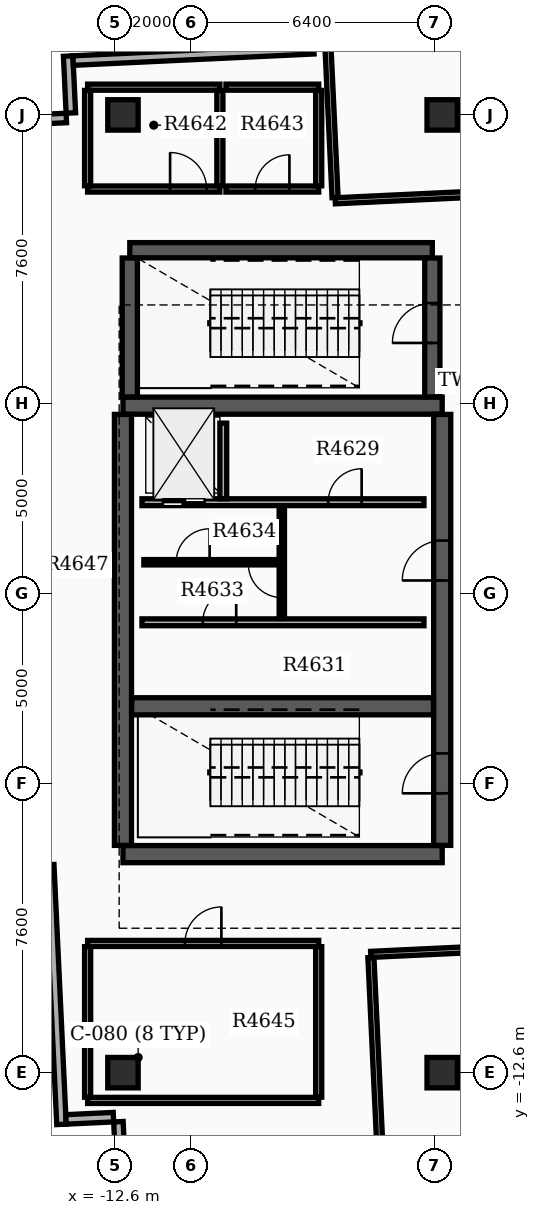
"""IFC4 building model, lengths in metres.
Left out: names, types, materials, properties, quantities, classifications, styles, units other than length and angle.
Written with IfcOpenShell. Run it as: python <this file> out.ifc"""

import sys

from ifc_helpers import new_model, si_unit, direction, frame, frame_2d, origin, origin_2d, place, context, subcontext, project, spatial, rectangle, extrude, element, fill, save


model = new_model("IFC4")
c1 = context("Model", 3, precision=1e-05, world=origin(), true_north=direction((0.0, 1.0)))
c2 = subcontext(c1, "Body", "Model", "MODEL_VIEW")
j1 = project(units=[si_unit("LENGTHUNIT", "METRE"), si_unit("PLANEANGLEUNIT", "RADIAN")], contexts=[c1])
p1 = place(None, origin())
s1 = spatial("IfcSite", under=j1, at=p1, CompositionType="ELEMENT")
p2 = place(p1, origin())
s2 = spatial("IfcBuilding", under=s1, at=p2, CompositionType="ELEMENT")
p3 = place(p2, frame((0.0, 0.0, 294.0)))
s3 = spatial("IfcBuildingStorey", under=s2, at=p3, CompositionType="ELEMENT", Elevation=294.0)
for number, where, z_axis, x_axis in (
    (1, (-12.4, -6.85, 0.0), (0.0, 0.0, 1.0), (1.0, 0.0, 0.0)),
    (2, (-12.4, 4.95, 0.0), (0.0, 0.0, 1.0), (1.0, 0.0, 0.0)),
):
    element("IfcWall", number, at=place(p3, frame(where, z_axis=z_axis, x_axis=x_axis)), inside=s3, PredefinedType="SHEAR", context=c2, shape_type="SweptSolid", body=[
        extrude(rectangle(XDim=8.4, YDim=0.45, at=frame_2d((4.2, 0.0))), origin(), (0.0, 0.0, 1.0), 5.15),
    ])
p4 = place(p3, frame((-12.4, -6.62, 0.0), z_axis=(0.0, 0.0, 1.0), x_axis=(0.0, 1.0, 0.0)))
e3 = element("IfcWall", 3, at=p4, inside=s3, PredefinedType="SHEAR", context=c2, shape_type="SweptSolid", body=[
    extrude(rectangle(XDim=11.34, YDim=0.45, at=frame_2d((5.67, 0.0))), origin(), (0.0, 0.0, 1.0), 5.15),
])
p5 = place(p3, frame((-4.0, -6.62, 0.0), z_axis=(0.0, 0.0, 1.0), x_axis=(0.0, 1.0, 0.0)))
e4 = element("IfcWall", 4, at=p5, inside=s3, PredefinedType="SHEAR", context=c2, shape_type="SweptSolid", body=[
    extrude(rectangle(XDim=11.34, YDim=0.45, at=frame_2d((5.67, 0.0))), origin(), (0.0, 0.0, 1.0), 5.15),
])
p6 = place(p5, frame((1.37, 0.0, 0.0)))
e5 = element("IfcOpeningElement", 5, at=p6, cuts=e4, PredefinedType="OPENING", context=c2, shape_type="SweptSolid", body=[
    extrude(rectangle(XDim=1.05, YDim=2.15, at=frame_2d((0.525, 1.075))), frame((0.0, 0.235, 0.0), z_axis=(0.0, -1.0, 0.0), x_axis=(1.0, 0.0, 0.0)), (0.0, 0.0, 1.0), 0.47),
])
p7 = place(p5, frame((6.97, 0.0, 0.0)))
e6 = element("IfcOpeningElement", 6, at=p7, cuts=e4, PredefinedType="OPENING", context=c2, shape_type="SweptSolid", body=[
    extrude(rectangle(XDim=1.05, YDim=2.15, at=frame_2d((0.525, 1.075))), frame((0.0, 0.235, 0.0), z_axis=(0.0, -1.0, 0.0), x_axis=(1.0, 0.0, 0.0)), (0.0, 0.0, 1.0), 0.47),
])
p8 = place(p3, frame((-12.17, -2.96, 0.0), z_axis=(0.0, 0.0, 1.0), x_axis=(1.0, 0.0, 0.0)))
e7 = element("IfcWall", 7, at=p8, inside=s3, PredefinedType="SHEAR", context=c2, shape_type="SweptSolid", body=[
    extrude(rectangle(XDim=7.94, YDim=0.45, at=frame_2d((3.97, 0.0))), origin(), (0.0, 0.0, 1.0), 5.15),
])
p9 = place(p3, frame((-12.22, 9.04, 0.0), z_axis=(0.0, 0.0, 1.0), x_axis=(1.0, 0.0, 0.0)))
e8 = element("IfcWall", 8, at=p9, inside=s3, PredefinedType="SHEAR", context=c2, shape_type="SweptSolid", body=[
    extrude(rectangle(XDim=7.96, YDim=0.4, at=frame_2d((3.98, 0.0))), origin(), (0.0, 0.0, 1.0), 5.15),
])
p10 = place(p3, frame((-12.22, 5.18, 0.0), z_axis=(0.0, 0.0, 1.0), x_axis=(0.0, 1.0, 0.0)))
e9 = element("IfcWall", 9, at=p10, inside=s3, PredefinedType="SHEAR", context=c2, shape_type="SweptSolid", body=[
    extrude(rectangle(XDim=3.655, YDim=0.4, at=frame_2d((1.828, 0.0))), origin(), (0.0, 0.0, 1.0), 5.15),
])
p11 = place(p3, frame((-4.26, 5.18, 0.0), z_axis=(0.0, 0.0, 1.0), x_axis=(0.0, 1.0, 0.0)))
e10 = element("IfcWall", 10, at=p11, inside=s3, PredefinedType="SHEAR", context=c2, shape_type="SweptSolid", body=[
    extrude(rectangle(XDim=3.655, YDim=0.4, at=frame_2d((1.828, 0.0))), origin(), (0.0, 0.0, 1.0), 5.15),
])
p12 = place(p11, frame((1.42, 0.0, 0.0)))
e11 = element("IfcOpeningElement", 11, at=p12, cuts=e10, PredefinedType="OPENING", context=c2, shape_type="SweptSolid", body=[
    extrude(rectangle(XDim=1.05, YDim=2.15, at=frame_2d((0.525, 1.075))), frame((0.0, 0.21, 0.0), z_axis=(0.0, -1.0, 0.0), x_axis=(1.0, 0.0, 0.0)), (0.0, 0.0, 1.0), 0.42),
])
for number, where, z_axis, x_axis in (
    (12, (-12.4, -12.6, 0.0), (0.0, 0.0, 1.0), (1.0, 0.0, 0.0)),
    (13, (-12.4, 12.6, 0.0), (0.0, 0.0, 1.0), (1.0, 0.0, 0.0)),
    (14, (-4.0, -12.6, 0.0), (0.0, 0.0, 1.0), (1.0, 0.0, 0.0)),
    (15, (-4.0, 12.6, 0.0), (0.0, 0.0, 1.0), (1.0, 0.0, 0.0)),
):
    element("IfcColumn", number, at=place(p3, frame(where, z_axis=z_axis, x_axis=x_axis)), inside=s3, PredefinedType="COLUMN", context=c2, shape_type="SweptSolid", body=[
        extrude(rectangle(XDim=0.8, YDim=0.8, at=origin_2d()), origin(), (0.0, 0.0, 1.0), 5.4),
    ])
p13 = place(p3, frame((-15.139, 12.461, 0.0), z_axis=(0.0, 0.0, 1.0), x_axis=(0.998891870632, 0.047064113553, 0.0)))
e16 = element("IfcWall", 16, at=p13, inside=s3, PredefinedType="STANDARD", context=c2, shape_type="SweptSolid", body=[
    extrude(rectangle(XDim=1.25, YDim=0.25, at=frame_2d((0.625, 0.0))), origin(), (0.0, 0.0, 1.0), 4.06),
])
p14 = place(p3, frame((-13.771, 12.65, 0.0), z_axis=(0.0, 0.0, 1.0), x_axis=(-0.047039284441, 0.99889304018, 0.0)))
e17 = element("IfcWall", 17, at=p14, inside=s3, PredefinedType="STANDARD", context=c2, shape_type="SweptSolid", body=[
    extrude(rectangle(XDim=1.5, YDim=0.25, at=frame_2d((0.75, 0.0))), origin(), (0.0, 0.0, 1.0), 4.06),
])
p15 = place(p3, frame((-13.711, 14.03, 0.0), z_axis=(0.0, 0.0, 1.0), x_axis=(0.998890417296, 0.047094949127, 0.0)))
e18 = element("IfcWall", 18, at=p15, inside=s3, PredefinedType="STANDARD", context=c2, shape_type="SweptSolid", body=[
    extrude(rectangle(XDim=6.34, YDim=0.25, at=frame_2d((3.17, 0.0))), origin(), (0.0, 0.0, 1.0), 4.06),
])
p16 = place(p3, frame((-14.34, -7.128, 0.0), z_axis=(0.0, 0.0, 1.0), x_axis=(0.047115742593, -0.998889436725, 0.0)))
e19 = element("IfcWall", 19, at=p16, inside=s3, PredefinedType="STANDARD", context=c2, shape_type="SweptSolid", body=[
    extrude(rectangle(XDim=6.84, YDim=0.25, at=frame_2d((3.42, 0.0))), origin(), (0.0, 0.0, 1.0), 4.06),
])
p17 = place(p3, frame((-13.899, -13.83, 0.0), z_axis=(0.0, 0.0, 1.0), x_axis=(0.99889143794, 0.047073296156, 0.0)))
e20 = element("IfcWall", 20, at=p17, inside=s3, PredefinedType="STANDARD", context=c2, shape_type="SweptSolid", body=[
    extrude(rectangle(XDim=1.25, YDim=0.25, at=frame_2d((0.625, 0.0))), origin(), (0.0, 0.0, 1.0), 4.06),
])
p18 = place(p3, frame((-12.52, -13.89, 0.0), z_axis=(0.0, 0.0, 1.0), x_axis=(0.047039284441, -0.99889304018, 0.0)))
e21 = element("IfcWall", 21, at=p18, inside=s3, PredefinedType="STANDARD", context=c2, shape_type="SweptSolid", body=[
    extrude(rectangle(XDim=1.5, YDim=0.25, at=frame_2d((0.75, 0.0))), origin(), (0.0, 0.0, 1.0), 4.06),
])
p19 = place(p3, frame((-11.9, 2.41, 0.0), z_axis=(0.0, 0.0, 1.0), x_axis=(1.0, 0.0, 0.0)))
e22 = element("IfcWall", 22, at=p19, inside=s3, PredefinedType="SOLIDWALL", context=c2, shape_type="SweptSolid", body=[
    extrude(rectangle(XDim=7.42, YDim=0.18, at=frame_2d((3.71, 0.0))), origin(), (0.0, 0.0, 1.0), 4.05),
])
p20 = place(p19, frame((0.55, 0.0, 0.0)))
e23 = element("IfcOpeningElement", 23, at=p20, cuts=e22, PredefinedType="OPENING", context=c2, shape_type="SweptSolid", body=[
    extrude(rectangle(XDim=1.1, YDim=2.15, at=frame_2d((0.55, 1.075))), frame((0.0, 0.1, 0.0), z_axis=(0.0, -1.0, 0.0), x_axis=(1.0, 0.0, 0.0)), (0.0, 0.0, 1.0), 0.2),
])
p21 = place(p19, frame((4.9, 0.0, 0.0)))
e24 = element("IfcOpeningElement", 24, at=p21, cuts=e22, PredefinedType="OPENING", context=c2, shape_type="SweptSolid", body=[
    extrude(rectangle(XDim=0.88, YDim=2.1, at=frame_2d((0.44, 1.05))), frame((0.0, 0.1, 0.0), z_axis=(0.0, -1.0, 0.0), x_axis=(1.0, 0.0, 0.0)), (0.0, 0.0, 1.0), 0.2),
])
p22 = place(p3, frame((-11.9, -0.75, 0.0), z_axis=(0.0, 0.0, 1.0), x_axis=(1.0, 0.0, 0.0)))
e25 = element("IfcWall", 25, at=p22, inside=s3, PredefinedType="SOLIDWALL", context=c2, shape_type="SweptSolid", body=[
    extrude(rectangle(XDim=7.42, YDim=0.18, at=frame_2d((3.71, 0.0))), origin(), (0.0, 0.0, 1.0), 4.05),
])
p23 = place(p22, frame((1.6, 0.0, 0.0)))
e26 = element("IfcOpeningElement", 26, at=p23, cuts=e25, PredefinedType="OPENING", context=c2, shape_type="SweptSolid", body=[
    extrude(rectangle(XDim=0.88, YDim=2.1, at=frame_2d((0.44, 1.05))), frame((0.0, 0.1, 0.0), z_axis=(0.0, -1.0, 0.0), x_axis=(1.0, 0.0, 0.0)), (0.0, 0.0, 1.0), 0.2),
])
p24 = place(p3, frame((-9.76, 2.5, 0.0), z_axis=(0.0, 0.0, 1.0), x_axis=(0.0, 1.0, 0.0)))
e27 = element("IfcWall", 27, at=p24, inside=s3, PredefinedType="SOLIDWALL", context=c2, shape_type="SweptSolid", body=[
    extrude(rectangle(XDim=1.99, YDim=0.18, at=frame_2d((0.995, 0.0))), origin(), (0.0, 0.0, 1.0), 4.05),
])
p25 = place(p3, frame((-8.22, -0.65, 0.0), z_axis=(0.0, 0.0, 1.0), x_axis=(0.0, 1.0, 0.0)))
e28 = element("IfcWall", 28, at=p25, inside=s3, PredefinedType="SOLIDWALL", context=c2, shape_type="SweptSolid", body=[
    extrude(rectangle(XDim=2.96, YDim=0.14, at=frame_2d((1.48, 0.0))), origin(), (0.0, 0.0, 1.0), 4.05),
])
p26 = place(p25, frame((0.55, 0.0, 0.0)))
e29 = element("IfcOpeningElement", 29, at=p26, cuts=e28, PredefinedType="OPENING", context=c2, shape_type="SweptSolid", body=[
    extrude(rectangle(XDim=0.88, YDim=2.1, at=frame_2d((0.44, 1.05))), frame((0.0, 0.08, 0.0), z_axis=(0.0, -1.0, 0.0), x_axis=(1.0, 0.0, 0.0)), (0.0, 0.0, 1.0), 0.16),
])
p27 = place(p3, frame((-11.85, 0.83, 0.0), z_axis=(0.0, 0.0, 1.0), x_axis=(1.0, 0.0, 0.0)))
e30 = element("IfcWall", 30, at=p27, inside=s3, PredefinedType="PARTITIONING", context=c2, shape_type="SweptSolid", body=[
    extrude(rectangle(XDim=3.552, YDim=0.14, at=frame_2d((1.776, 0.0))), origin(), (0.0, 0.0, 1.0), 4.05),
])
p28 = place(p27, frame((0.85, 0.0, 0.0)))
e31 = element("IfcOpeningElement", 31, at=p28, cuts=e30, PredefinedType="OPENING", context=c2, shape_type="SweptSolid", body=[
    extrude(rectangle(XDim=0.88, YDim=2.1, at=frame_2d((0.44, 1.05))), frame((0.0, 0.08, 0.0), z_axis=(0.0, -1.0, 0.0), x_axis=(1.0, 0.0, 0.0)), (0.0, 0.0, 1.0), 0.16),
])
p29 = place(p3, frame((-6.815, 10.341, 0.0), z_axis=(0.0, 0.0, 1.0), x_axis=(0.998890660658, 0.04708978712, 0.0)))
e32 = element("IfcWall", 32, at=p29, inside=s3, PredefinedType="PARTITIONING", context=c2, shape_type="SweptSolid", body=[
    extrude(rectangle(XDim=12.64, YDim=0.16, at=frame_2d((6.32, 0.0))), origin(), (0.0, 0.0, 1.0), 4.05),
])
p30 = place(p29, frame((5.57, 0.0, 0.0)))
e33 = element("IfcOpeningElement", 33, at=p30, cuts=e32, PredefinedType="OPENING", context=c2, shape_type="SweptSolid", body=[
    extrude(rectangle(XDim=1.5, YDim=2.15, at=frame_2d((0.75, 1.075))), frame((0.0, 0.09, 0.0), z_axis=(0.0, -1.0, 0.0), x_axis=(1.0, 0.0, 0.0)), (0.0, 0.0, 1.0), 0.18),
])
p31 = place(p3, frame((-6.819, 10.425, 0.0), z_axis=(0.0, 0.0, 1.0), x_axis=(-0.047112609649, 0.998889584495, 0.0)))
e34 = element("IfcWall", 34, at=p31, inside=s3, PredefinedType="PARTITIONING", context=c2, shape_type="SweptSolid", body=[
    extrude(rectangle(XDim=16.712, YDim=0.16, at=frame_2d((8.356, 0.0))), origin(), (0.0, 0.0, 1.0), 4.05),
])
p32 = place(p3, frame((-5.88, -9.488, 0.0), z_axis=(0.0, 0.0, 1.0), x_axis=(0.998889751946, 0.047109059189, 0.0)))
e35 = element("IfcWall", 35, at=p32, inside=s3, PredefinedType="PARTITIONING", context=c2, shape_type="SweptSolid", body=[
    extrude(rectangle(XDim=12.64, YDim=0.16, at=frame_2d((6.32, 0.0))), origin(), (0.0, 0.0, 1.0), 4.05),
])
p33 = place(p32, frame((5.84, 0.0, 0.0)))
e36 = element("IfcOpeningElement", 36, at=p33, cuts=e35, PredefinedType="OPENING", context=c2, shape_type="SweptSolid", body=[
    extrude(rectangle(XDim=0.96, YDim=2.15, at=frame_2d((0.48, 1.075))), frame((0.0, 0.09, 0.0), z_axis=(0.0, -1.0, 0.0), x_axis=(1.0, 0.0, 0.0)), (0.0, 0.0, 1.0), 0.18),
])
p34 = place(p3, frame((-5.02, -27.714, 0.0), z_axis=(0.0, 0.0, 1.0), x_axis=(-0.047102111975, 0.998890079562, 0.0)))
e37 = element("IfcWall", 37, at=p34, inside=s3, PredefinedType="PARTITIONING", context=c2, shape_type="SweptSolid", body=[
    extrude(rectangle(XDim=18.162, YDim=0.16, at=frame_2d((9.081, 0.0))), origin(), (0.0, 0.0, 1.0), 4.05),
])
p35 = place(p3, frame((-13.33, 10.65, 0.0), z_axis=(0.0, 0.0, 1.0), x_axis=(1.0, 0.0, 0.0)))
e38 = element("IfcWall", 38, at=p35, inside=s3, PredefinedType="PARTITIONING", context=c2, shape_type="SweptSolid", body=[
    extrude(rectangle(XDim=3.48, YDim=0.16, at=frame_2d((1.74, 0.0))), origin(), (0.0, 0.0, 1.0), 4.05),
])
p36 = place(p35, frame((2.17, 0.0, 0.0)))
e39 = element("IfcOpeningElement", 39, at=p36, cuts=e38, PredefinedType="OPENING", context=c2, shape_type="SweptSolid", body=[
    extrude(rectangle(XDim=0.96, YDim=2.15, at=frame_2d((0.48, 1.075))), frame((0.0, 0.09, 0.0), z_axis=(0.0, -1.0, 0.0), x_axis=(1.0, 0.0, 0.0)), (0.0, 0.0, 1.0), 0.18),
])
p37 = place(p3, frame((-13.33, 13.33, 0.0), z_axis=(0.0, 0.0, 1.0), x_axis=(1.0, 0.0, 0.0)))
e40 = element("IfcWall", 40, at=p37, inside=s3, PredefinedType="PARTITIONING", context=c2, shape_type="SweptSolid", body=[
    extrude(rectangle(XDim=3.48, YDim=0.16, at=frame_2d((1.74, 0.0))), origin(), (0.0, 0.0, 1.0), 4.05),
])
for number, where, z_axis, x_axis in (
    (41, (-13.33, 10.735, 0.0), (0.0, 0.0, 1.0), (0.0, 1.0, 0.0)),
    (42, (-9.85, 10.735, 0.0), (0.0, 0.0, 1.0), (0.0, 1.0, 0.0)),
):
    element("IfcWall", number, at=place(p3, frame(where, z_axis=z_axis, x_axis=x_axis)), inside=s3, PredefinedType="PARTITIONING", context=c2, shape_type="SweptSolid", body=[
        extrude(rectangle(XDim=2.51, YDim=0.16, at=frame_2d((1.255, 0.0))), origin(), (0.0, 0.0, 1.0), 4.05),
    ])
p38 = place(p3, frame((-9.69, 10.65, 0.0), z_axis=(0.0, 0.0, 1.0), x_axis=(1.0, 0.0, 0.0)))
e43 = element("IfcWall", 43, at=p38, inside=s3, PredefinedType="PARTITIONING", context=c2, shape_type="SweptSolid", body=[
    extrude(rectangle(XDim=2.44, YDim=0.16, at=frame_2d((1.22, 0.0))), origin(), (0.0, 0.0, 1.0), 4.05),
])
p39 = place(p38, frame((0.77, 0.0, 0.0)))
e44 = element("IfcOpeningElement", 44, at=p39, cuts=e43, PredefinedType="OPENING", context=c2, shape_type="SweptSolid", body=[
    extrude(rectangle(XDim=0.9, YDim=2.15, at=frame_2d((0.45, 1.075))), frame((0.0, 0.09, 0.0), z_axis=(0.0, -1.0, 0.0), x_axis=(1.0, 0.0, 0.0)), (0.0, 0.0, 1.0), 0.18),
])
p40 = place(p3, frame((-9.69, 13.33, 0.0), z_axis=(0.0, 0.0, 1.0), x_axis=(1.0, 0.0, 0.0)))
e45 = element("IfcWall", 45, at=p40, inside=s3, PredefinedType="PARTITIONING", context=c2, shape_type="SweptSolid", body=[
    extrude(rectangle(XDim=2.44, YDim=0.16, at=frame_2d((1.22, 0.0))), origin(), (0.0, 0.0, 1.0), 4.05),
])
p41 = place(p3, frame((-7.25, 10.735, 0.0), z_axis=(0.0, 0.0, 1.0), x_axis=(0.0, 1.0, 0.0)))
e46 = element("IfcWall", 46, at=p41, inside=s3, PredefinedType="PARTITIONING", context=c2, shape_type="SweptSolid", body=[
    extrude(rectangle(XDim=2.51, YDim=0.16, at=frame_2d((1.255, 0.0))), origin(), (0.0, 0.0, 1.0), 4.05),
])
p42 = place(p3, frame((-13.33, -13.33, 0.0), z_axis=(0.0, 0.0, 1.0), x_axis=(1.0, 0.0, 0.0)))
e47 = element("IfcWall", 47, at=p42, inside=s3, PredefinedType="PARTITIONING", context=c2, shape_type="SweptSolid", body=[
    extrude(rectangle(XDim=6.08, YDim=0.16, at=frame_2d((3.04, 0.0))), origin(), (0.0, 0.0, 1.0), 4.05),
])
p43 = place(p3, frame((-13.33, -9.2, 0.0), z_axis=(0.0, 0.0, 1.0), x_axis=(1.0, 0.0, 0.0)))
e48 = element("IfcWall", 48, at=p43, inside=s3, PredefinedType="PARTITIONING", context=c2, shape_type="SweptSolid", body=[
    extrude(rectangle(XDim=6.08, YDim=0.16, at=frame_2d((3.04, 0.0))), origin(), (0.0, 0.0, 1.0), 4.05),
])
p44 = place(p43, frame((2.56, 0.0, 0.0)))
e49 = element("IfcOpeningElement", 49, at=p44, cuts=e48, PredefinedType="OPENING", context=c2, shape_type="SweptSolid", body=[
    extrude(rectangle(XDim=0.96, YDim=2.15, at=frame_2d((0.48, 1.075))), frame((0.0, 0.09, 0.0), z_axis=(0.0, -1.0, 0.0), x_axis=(1.0, 0.0, 0.0)), (0.0, 0.0, 1.0), 0.18),
])
for number, where, z_axis, x_axis in (
    (50, (-13.33, -13.245, 0.0), (0.0, 0.0, 1.0), (0.0, 1.0, 0.0)),
    (51, (-7.25, -13.245, 0.0), (0.0, 0.0, 1.0), (0.0, 1.0, 0.0)),
):
    element("IfcWall", number, at=place(p3, frame(where, z_axis=z_axis, x_axis=x_axis)), inside=s3, PredefinedType="PARTITIONING", context=c2, shape_type="SweptSolid", body=[
        extrude(rectangle(XDim=3.96, YDim=0.16, at=frame_2d((1.98, 0.0))), origin(), (0.0, 0.0, 1.0), 4.05),
    ])
p45 = place(p6, origin())
e52 = element("IfcDoor", 52, at=p45, inside=s3, OperationType="SINGLE_SWING_LEFT", PredefinedType="DOOR", context=c2, shape_type="SweptSolid", body=[
    extrude(rectangle(XDim=1.05, YDim=2.15, at=frame_2d((0.525, 1.075))), frame((0.0, 0.025, 0.0), z_axis=(0.0, -1.0, 0.0), x_axis=(1.0, 0.0, 0.0)), (0.0, 0.0, 1.0), 0.05),
])
fill(e5, e52)
p46 = place(p7, origin())
e53 = element("IfcDoor", 53, at=p46, inside=s3, OperationType="SINGLE_SWING_LEFT", PredefinedType="DOOR", context=c2, shape_type="SweptSolid", body=[
    extrude(rectangle(XDim=1.05, YDim=2.15, at=frame_2d((0.525, 1.075))), frame((0.0, 0.025, 0.0), z_axis=(0.0, -1.0, 0.0), x_axis=(1.0, 0.0, 0.0)), (0.0, 0.0, 1.0), 0.05),
])
fill(e6, e53)
p47 = place(p12, origin())
e54 = element("IfcDoor", 54, at=p47, inside=s3, OperationType="SINGLE_SWING_LEFT", PredefinedType="DOOR", context=c2, shape_type="SweptSolid", body=[
    extrude(rectangle(XDim=1.05, YDim=2.15, at=frame_2d((0.525, 1.075))), frame((0.0, 0.025, 0.0), z_axis=(0.0, -1.0, 0.0), x_axis=(1.0, 0.0, 0.0)), (0.0, 0.0, 1.0), 0.05),
])
fill(e11, e54)
p48 = place(p20, origin())
e55 = element("IfcDoor", 55, at=p48, inside=s3, OperationType="DOUBLE_DOOR_SLIDING", PredefinedType="DOOR", context=c2, shape_type="SweptSolid", body=[
    extrude(rectangle(XDim=1.1, YDim=2.15, at=frame_2d((0.55, 1.075))), frame((0.0, 0.025, 0.0), z_axis=(0.0, -1.0, 0.0), x_axis=(1.0, 0.0, 0.0)), (0.0, 0.0, 1.0), 0.05),
])
fill(e23, e55)
p49 = place(p21, origin())
e56 = element("IfcDoor", 56, at=p49, inside=s3, OperationType="SINGLE_SWING_RIGHT", PredefinedType="DOOR", context=c2, shape_type="SweptSolid", body=[
    extrude(rectangle(XDim=0.88, YDim=2.1, at=frame_2d((0.44, 1.05))), frame((0.0, 0.025, 0.0), z_axis=(0.0, -1.0, 0.0), x_axis=(1.0, 0.0, 0.0)), (0.0, 0.0, 1.0), 0.05),
])
fill(e24, e56)
p50 = place(p23, origin())
e57 = element("IfcDoor", 57, at=p50, inside=s3, OperationType="SINGLE_SWING_RIGHT", PredefinedType="DOOR", context=c2, shape_type="SweptSolid", body=[
    extrude(rectangle(XDim=0.88, YDim=2.1, at=frame_2d((0.44, 1.05))), frame((0.0, 0.025, 0.0), z_axis=(0.0, -1.0, 0.0), x_axis=(1.0, 0.0, 0.0)), (0.0, 0.0, 1.0), 0.05),
])
fill(e26, e57)
p51 = place(p26, origin())
e58 = element("IfcDoor", 58, at=p51, inside=s3, OperationType="SINGLE_SWING_RIGHT", PredefinedType="DOOR", context=c2, shape_type="SweptSolid", body=[
    extrude(rectangle(XDim=0.88, YDim=2.1, at=frame_2d((0.44, 1.05))), frame((0.0, 0.025, 0.0), z_axis=(0.0, -1.0, 0.0), x_axis=(1.0, 0.0, 0.0)), (0.0, 0.0, 1.0), 0.05),
])
fill(e29, e58)
p52 = place(p28, origin())
e59 = element("IfcDoor", 59, at=p52, inside=s3, OperationType="SINGLE_SWING_RIGHT", PredefinedType="DOOR", context=c2, shape_type="SweptSolid", body=[
    extrude(rectangle(XDim=0.88, YDim=2.1, at=frame_2d((0.44, 1.05))), frame((0.0, 0.025, 0.0), z_axis=(0.0, -1.0, 0.0), x_axis=(1.0, 0.0, 0.0)), (0.0, 0.0, 1.0), 0.05),
])
fill(e31, e59)
p53 = place(p36, origin())
e60 = element("IfcDoor", 60, at=p53, inside=s3, OperationType="SINGLE_SWING_LEFT", PredefinedType="DOOR", context=c2, shape_type="SweptSolid", body=[
    extrude(rectangle(XDim=0.96, YDim=2.15, at=frame_2d((0.48, 1.075))), frame((0.0, 0.025, 0.0), z_axis=(0.0, -1.0, 0.0), x_axis=(1.0, 0.0, 0.0)), (0.0, 0.0, 1.0), 0.05),
])
fill(e39, e60)
p54 = place(p39, origin())
e61 = element("IfcDoor", 61, at=p54, inside=s3, OperationType="SINGLE_SWING_RIGHT", PredefinedType="DOOR", context=c2, shape_type="SweptSolid", body=[
    extrude(rectangle(XDim=0.9, YDim=2.15, at=frame_2d((0.45, 1.075))), frame((0.0, 0.025, 0.0), z_axis=(0.0, -1.0, 0.0), x_axis=(1.0, 0.0, 0.0)), (0.0, 0.0, 1.0), 0.05),
])
fill(e44, e61)
p55 = place(p44, origin())
e62 = element("IfcDoor", 62, at=p55, inside=s3, OperationType="SINGLE_SWING_RIGHT", PredefinedType="DOOR", context=c2, shape_type="SweptSolid", body=[
    extrude(rectangle(XDim=0.96, YDim=2.15, at=frame_2d((0.48, 1.075))), frame((0.0, 0.025, 0.0), z_axis=(0.0, -1.0, 0.0), x_axis=(1.0, 0.0, 0.0)), (0.0, 0.0, 1.0), 0.05),
])
fill(e49, e62)
save(model, sys.argv[1])
